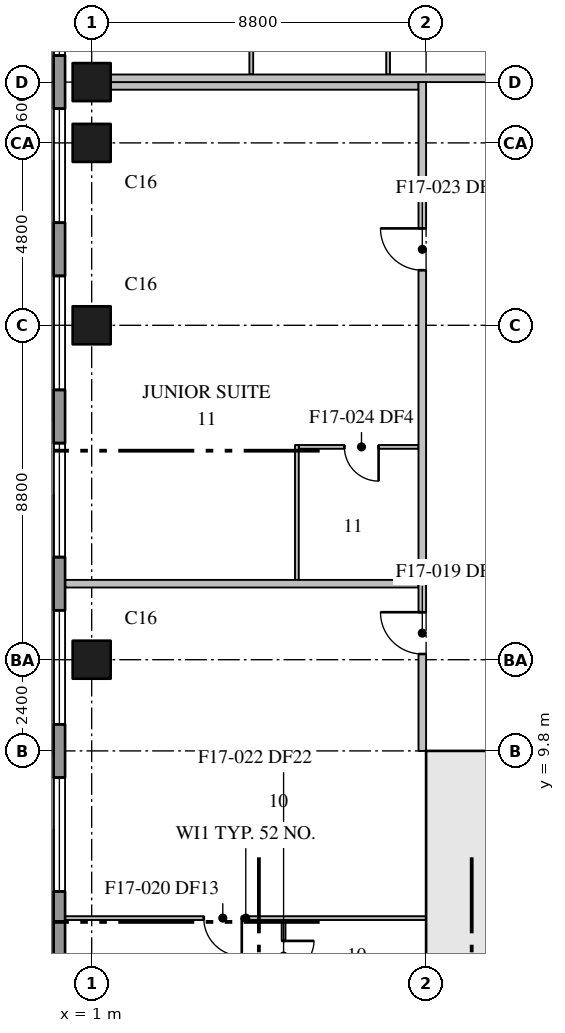
"""IFC4 building model, lengths in metres.
Left out: names, types, materials, properties, quantities, classifications, styles, units other than length and angle.
Written with IfcOpenShell. Run it as: python <this file> out.ifc"""

import sys

from ifc_helpers import new_model, si_unit, direction, frame, frame_2d, origin, origin_2d, place, context, subcontext, project, spatial, rectangle, extrude, element, fill, save


model = new_model("IFC4")
c1 = context("Model", 3, precision=1e-05, world=origin(), true_north=direction((0.0, 1.0)))
c2 = subcontext(c1, "Body", "Model", "MODEL_VIEW")
j1 = project(units=[si_unit("LENGTHUNIT", "METRE"), si_unit("PLANEANGLEUNIT", "RADIAN")], contexts=[c1])
p1 = place(None, origin())
s1 = spatial("IfcSite", under=j1, at=p1, CompositionType="ELEMENT")
p2 = place(p1, origin())
s2 = spatial("IfcBuilding", under=s1, at=p2, CompositionType="ELEMENT")
p3 = place(p2, frame((0.0, 0.0, 153.1)))
s3 = spatial("IfcBuildingStorey", under=s2, at=p3, CompositionType="ELEMENT", Elevation=153.1)
for number, where, z_axis, x_axis in (
    (1, (1.0, 12.2, 0.0), (0.0, 0.0, 1.0), (1.0, 0.0, 0.0)),
    (2, (1.0, 21.0, 0.0), (0.0, 0.0, 1.0), (1.0, 0.0, 0.0)),
    (3, (1.0, 25.8, 0.0), (0.0, 0.0, 1.0), (1.0, 0.0, 0.0)),
    (4, (1.0, 27.4, 0.0), (0.0, 0.0, 1.0), (1.0, 0.0, 0.0)),
):
    element("IfcColumn", number, at=place(p3, frame(where, z_axis=z_axis, x_axis=x_axis)), inside=s3, PredefinedType="COLUMN", context=c2, shape_type="SweptSolid", body=[
        extrude(rectangle(XDim=1.0, YDim=1.0, at=origin_2d()), origin(), (0.0, 0.0, 1.0), 3.7),
    ])
p4 = place(p3, frame((10.675, 1.2, 0.0), z_axis=(0.0, 0.0, 1.0), x_axis=(0.0, 1.0, 0.0)))
e5 = element("IfcWall", 5, at=p4, inside=s3, PredefinedType="SHEAR", context=c2, shape_type="SweptSolid", body=[
    extrude(rectangle(XDim=8.6, YDim=0.65, at=frame_2d((4.3, 0.0))), origin(), (0.0, 0.0, 1.0), 3.7),
])
p5 = place(p3, frame((9.8, 9.6, 0.0), z_axis=(0.0, 0.0, 1.0), x_axis=(1.0, 0.0, 0.0)))
e6 = element("IfcWall", 6, at=p5, inside=s3, PredefinedType="SHEAR", context=c2, shape_type="SweptSolid", body=[
    extrude(rectangle(XDim=4.3, YDim=0.4, at=frame_2d((2.15, 0.0))), origin(), (0.0, 0.0, 1.0), 3.7),
])
p6 = place(p5, frame((2.05, 0.0, 0.0)))
e7 = element("IfcOpeningElement", 7, at=p6, cuts=e6, PredefinedType="OPENING", context=c2, shape_type="SweptSolid", body=[
    extrude(rectangle(XDim=1.2, YDim=2.1, at=frame_2d((0.6, 1.05))), frame((0.0, 0.21, 0.0), z_axis=(0.0, -1.0, 0.0), x_axis=(1.0, 0.0, 0.0)), (0.0, 0.0, 1.0), 0.42),
])
p7 = place(p3, frame((0.15, 61.1, 0.0), z_axis=(0.0, 0.0, 1.0), x_axis=(0.0, -1.0, 0.0)))
e8 = element("IfcWall", 8, at=p7, inside=s3, PredefinedType="STANDARD", context=c2, shape_type="SweptSolid", body=[
    extrude(rectangle(XDim=58.9, YDim=0.3, at=frame_2d((29.45, 0.0))), origin(), (0.0, 0.0, 1.0), 3.4),
])
p8 = place(p7, frame((3.6, 0.0, 0.75)))
e9 = element("IfcOpeningElement", 9, at=p8, cuts=e8, PredefinedType="OPENING", context=c2, shape_type="SweptSolid", body=[
    extrude(rectangle(XDim=3.0, YDim=2.3, at=frame_2d((1.5, 1.15))), frame((0.0, 0.16, 0.0), z_axis=(0.0, -1.0, 0.0), x_axis=(1.0, 0.0, 0.0)), (0.0, 0.0, 1.0), 0.32),
])
p9 = place(p7, frame((8.0, 0.0, 0.75)))
e10 = element("IfcOpeningElement", 10, at=p9, cuts=e8, PredefinedType="OPENING", context=c2, shape_type="SweptSolid", body=[
    extrude(rectangle(XDim=3.0, YDim=2.3, at=frame_2d((1.5, 1.15))), frame((0.0, 0.16, 0.0), z_axis=(0.0, -1.0, 0.0), x_axis=(1.0, 0.0, 0.0)), (0.0, 0.0, 1.0), 0.32),
])
p10 = place(p7, frame((12.4, 0.0, 0.75)))
e11 = element("IfcOpeningElement", 11, at=p10, cuts=e8, PredefinedType="OPENING", context=c2, shape_type="SweptSolid", body=[
    extrude(rectangle(XDim=3.0, YDim=2.3, at=frame_2d((1.5, 1.15))), frame((0.0, 0.16, 0.0), z_axis=(0.0, -1.0, 0.0), x_axis=(1.0, 0.0, 0.0)), (0.0, 0.0, 1.0), 0.32),
])
p11 = place(p7, frame((16.8, 0.0, 0.75)))
e12 = element("IfcOpeningElement", 12, at=p11, cuts=e8, PredefinedType="OPENING", context=c2, shape_type="SweptSolid", body=[
    extrude(rectangle(XDim=3.0, YDim=2.3, at=frame_2d((1.5, 1.15))), frame((0.0, 0.16, 0.0), z_axis=(0.0, -1.0, 0.0), x_axis=(1.0, 0.0, 0.0)), (0.0, 0.0, 1.0), 0.32),
])
p12 = place(p7, frame((21.2, 0.0, 0.75)))
e13 = element("IfcOpeningElement", 13, at=p12, cuts=e8, PredefinedType="OPENING", context=c2, shape_type="SweptSolid", body=[
    extrude(rectangle(XDim=3.0, YDim=2.3, at=frame_2d((1.5, 1.15))), frame((0.0, 0.16, 0.0), z_axis=(0.0, -1.0, 0.0), x_axis=(1.0, 0.0, 0.0)), (0.0, 0.0, 1.0), 0.32),
])
p13 = place(p7, frame((25.6, 0.0, 0.75)))
e14 = element("IfcOpeningElement", 14, at=p13, cuts=e8, PredefinedType="OPENING", context=c2, shape_type="SweptSolid", body=[
    extrude(rectangle(XDim=3.0, YDim=2.3, at=frame_2d((1.5, 1.15))), frame((0.0, 0.16, 0.0), z_axis=(0.0, -1.0, 0.0), x_axis=(1.0, 0.0, 0.0)), (0.0, 0.0, 1.0), 0.32),
])
p14 = place(p7, frame((30.0, 0.0, 0.75)))
e15 = element("IfcOpeningElement", 15, at=p14, cuts=e8, PredefinedType="OPENING", context=c2, shape_type="SweptSolid", body=[
    extrude(rectangle(XDim=3.0, YDim=2.3, at=frame_2d((1.5, 1.15))), frame((0.0, 0.16, 0.0), z_axis=(0.0, -1.0, 0.0), x_axis=(1.0, 0.0, 0.0)), (0.0, 0.0, 1.0), 0.32),
])
p15 = place(p7, frame((34.4, 0.0, 0.75)))
e16 = element("IfcOpeningElement", 16, at=p15, cuts=e8, PredefinedType="OPENING", context=c2, shape_type="SweptSolid", body=[
    extrude(rectangle(XDim=3.0, YDim=2.3, at=frame_2d((1.5, 1.15))), frame((0.0, 0.16, 0.0), z_axis=(0.0, -1.0, 0.0), x_axis=(1.0, 0.0, 0.0)), (0.0, 0.0, 1.0), 0.32),
])
p16 = place(p7, frame((38.8, 0.0, 0.75)))
e17 = element("IfcOpeningElement", 17, at=p16, cuts=e8, PredefinedType="OPENING", context=c2, shape_type="SweptSolid", body=[
    extrude(rectangle(XDim=3.0, YDim=2.3, at=frame_2d((1.5, 1.15))), frame((0.0, 0.16, 0.0), z_axis=(0.0, -1.0, 0.0), x_axis=(1.0, 0.0, 0.0)), (0.0, 0.0, 1.0), 0.32),
])
p17 = place(p7, frame((43.2, 0.0, 0.75)))
e18 = element("IfcOpeningElement", 18, at=p17, cuts=e8, PredefinedType="OPENING", context=c2, shape_type="SweptSolid", body=[
    extrude(rectangle(XDim=3.0, YDim=2.3, at=frame_2d((1.5, 1.15))), frame((0.0, 0.16, 0.0), z_axis=(0.0, -1.0, 0.0), x_axis=(1.0, 0.0, 0.0)), (0.0, 0.0, 1.0), 0.32),
])
p18 = place(p7, frame((47.6, 0.0, 0.75)))
e19 = element("IfcOpeningElement", 19, at=p18, cuts=e8, PredefinedType="OPENING", context=c2, shape_type="SweptSolid", body=[
    extrude(rectangle(XDim=3.0, YDim=2.3, at=frame_2d((1.5, 1.15))), frame((0.0, 0.16, 0.0), z_axis=(0.0, -1.0, 0.0), x_axis=(1.0, 0.0, 0.0)), (0.0, 0.0, 1.0), 0.32),
])
p19 = place(p7, frame((52.0, 0.0, 0.75)))
e20 = element("IfcOpeningElement", 20, at=p19, cuts=e8, PredefinedType="OPENING", context=c2, shape_type="SweptSolid", body=[
    extrude(rectangle(XDim=3.0, YDim=2.3, at=frame_2d((1.5, 1.15))), frame((0.0, 0.16, 0.0), z_axis=(0.0, -1.0, 0.0), x_axis=(1.0, 0.0, 0.0)), (0.0, 0.0, 1.0), 0.32),
])
p20 = place(p3, frame((9.7, 9.8, 0.0), z_axis=(0.0, 0.0, 1.0), x_axis=(0.0, 1.0, 0.0)))
e21 = element("IfcWall", 21, at=p20, inside=s3, PredefinedType="PARTITIONING", context=c2, shape_type="SweptSolid", body=[
    extrude(rectangle(XDim=17.6, YDim=0.2, at=frame_2d((8.8, 0.0))), origin(), (0.0, 0.0, 1.0), 3.4),
])
p21 = place(p20, frame((2.55, 0.0, 0.0)))
e22 = element("IfcOpeningElement", 22, at=p21, cuts=e21, PredefinedType="OPENING", context=c2, shape_type="SweptSolid", body=[
    extrude(rectangle(XDim=1.1, YDim=2.1, at=frame_2d((0.55, 1.05))), frame((0.0, 0.11, 0.0), z_axis=(0.0, -1.0, 0.0), x_axis=(1.0, 0.0, 0.0)), (0.0, 0.0, 1.0), 0.22),
])
p22 = place(p20, frame((12.65, 0.0, 0.0)))
e23 = element("IfcOpeningElement", 23, at=p22, cuts=e21, PredefinedType="OPENING", context=c2, shape_type="SweptSolid", body=[
    extrude(rectangle(XDim=1.1, YDim=2.1, at=frame_2d((0.55, 1.05))), frame((0.0, 0.11, 0.0), z_axis=(0.0, -1.0, 0.0), x_axis=(1.0, 0.0, 0.0)), (0.0, 0.0, 1.0), 0.22),
])
p23 = place(p3, frame((0.31, 14.2, 0.0), z_axis=(0.0, 0.0, 1.0), x_axis=(1.0, 0.0, 0.0)))
e24 = element("IfcWall", 24, at=p23, inside=s3, PredefinedType="PARTITIONING", context=c2, shape_type="SweptSolid", body=[
    extrude(rectangle(XDim=9.29, YDim=0.2, at=frame_2d((4.645, 0.0))), origin(), (0.0, 0.0, 1.0), 3.4),
])
p24 = place(p3, frame((1.5, 27.3, 0.0), z_axis=(0.0, 0.0, 1.0), x_axis=(1.0, 0.0, 0.0)))
e25 = element("IfcWall", 25, at=p24, inside=s3, PredefinedType="PARTITIONING", context=c2, shape_type="SweptSolid", body=[
    extrude(rectangle(XDim=8.1, YDim=0.2, at=frame_2d((4.05, 0.0))), origin(), (0.0, 0.0, 1.0), 3.4),
])
p25 = place(p3, frame((1.5, 27.5, 0.0), z_axis=(0.0, 0.0, 1.0), x_axis=(1.0, 0.0, 0.0)))
e26 = element("IfcWall", 26, at=p25, inside=s3, PredefinedType="PARTITIONING", context=c2, shape_type="SweptSolid", body=[
    extrude(rectangle(XDim=10.3, YDim=0.2, at=frame_2d((5.15, 0.0))), origin(), (0.0, 0.0, 1.0), 3.4),
])
p26 = place(p3, frame((9.6, 17.8, 0.0), z_axis=(0.0, 0.0, 1.0), x_axis=(-1.0, 0.0, 0.0)))
e27 = element("IfcWall", 27, at=p26, inside=s3, PredefinedType="PARTITIONING", context=c2, shape_type="SweptSolid", body=[
    extrude(rectangle(XDim=3.15, YDim=0.1, at=frame_2d((1.575, 0.0))), origin(), (0.0, 0.0, 1.0), 3.4),
])
p27 = place(p26, frame((1.05, 0.0, 0.0)))
e28 = element("IfcOpeningElement", 28, at=p27, cuts=e27, PredefinedType="OPENING", context=c2, shape_type="SweptSolid", body=[
    extrude(rectangle(XDim=0.9, YDim=2.1, at=frame_2d((0.45, 1.05))), frame((0.0, 0.06, 0.0), z_axis=(0.0, -1.0, 0.0), x_axis=(1.0, 0.0, 0.0)), (0.0, 0.0, 1.0), 0.12),
])
p28 = place(p3, frame((6.05, 5.35, 0.0), z_axis=(0.0, 0.0, 1.0), x_axis=(0.0, -1.0, 0.0)))
e29 = element("IfcWall", 29, at=p28, inside=s3, PredefinedType="PARTITIONING", context=c2, shape_type="SweptSolid", body=[
    extrude(rectangle(XDim=4.4, YDim=0.1, at=frame_2d((2.2, 0.0))), origin(), (0.0, 0.0, 1.0), 3.4),
])
p29 = place(p28, frame((2.7, 0.0, 0.0)))
e30 = element("IfcOpeningElement", 30, at=p29, cuts=e29, PredefinedType="OPENING", context=c2, shape_type="SweptSolid", body=[
    extrude(rectangle(XDim=0.9, YDim=2.1, at=frame_2d((0.45, 1.05))), frame((0.0, 0.06, 0.0), z_axis=(0.0, -1.0, 0.0), x_axis=(1.0, 0.0, 0.0)), (0.0, 0.0, 1.0), 0.12),
])
p30 = place(p28, frame((0.55, 0.0, 0.0)))
e31 = element("IfcOpeningElement", 31, at=p30, cuts=e29, PredefinedType="OPENING", context=c2, shape_type="SweptSolid", body=[
    extrude(rectangle(XDim=0.8, YDim=2.1, at=frame_2d((0.4, 1.05))), frame((0.0, 0.06, 0.0), z_axis=(0.0, -1.0, 0.0), x_axis=(1.0, 0.0, 0.0)), (0.0, 0.0, 1.0), 0.12),
])
p31 = place(p3, frame((9.8, 5.4, 0.0), z_axis=(0.0, 0.0, 1.0), x_axis=(-1.0, 0.0, 0.0)))
e32 = element("IfcWall", 32, at=p31, inside=s3, PredefinedType="PARTITIONING", context=c2, shape_type="SweptSolid", body=[
    extrude(rectangle(XDim=9.49, YDim=0.1, at=frame_2d((4.745, 0.0))), origin(), (0.0, 0.0, 1.0), 3.4),
])
p32 = place(p31, frame((4.85, 0.0, 0.0)))
e33 = element("IfcOpeningElement", 33, at=p32, cuts=e32, PredefinedType="OPENING", context=c2, shape_type="SweptSolid", body=[
    extrude(rectangle(XDim=1.0, YDim=2.1, at=frame_2d((0.5, 1.05))), frame((0.0, 0.06, 0.0), z_axis=(0.0, -1.0, 0.0), x_axis=(1.0, 0.0, 0.0)), (0.0, 0.0, 1.0), 0.12),
])
p33 = place(p3, frame((6.4, 14.3, 0.0), z_axis=(0.0, 0.0, 1.0), x_axis=(0.0, 1.0, 0.0)))
e34 = element("IfcWall", 34, at=p33, inside=s3, PredefinedType="PARTITIONING", context=c2, shape_type="SweptSolid", body=[
    extrude(rectangle(XDim=3.55, YDim=0.1, at=frame_2d((1.775, 0.0))), origin(), (0.0, 0.0, 1.0), 3.4),
])
p34 = place(p3, frame((5.2, 27.6, 0.0), z_axis=(0.0, 0.0, 1.0), x_axis=(0.0, 1.0, 0.0)))
e35 = element("IfcWall", 35, at=p34, inside=s3, PredefinedType="PARTITIONING", context=c2, shape_type="SweptSolid", body=[
    extrude(rectangle(XDim=2.55, YDim=0.1, at=frame_2d((1.275, 0.0))), origin(), (0.0, 0.0, 1.0), 3.4),
])
p35 = place(p3, frame((8.8, 27.6, 0.0), z_axis=(0.0, 0.0, 1.0), x_axis=(0.0, 1.0, 0.0)))
e36 = element("IfcWall", 36, at=p35, inside=s3, PredefinedType="PARTITIONING", context=c2, shape_type="SweptSolid", body=[
    extrude(rectangle(XDim=2.45, YDim=0.1, at=frame_2d((1.225, 0.0))), origin(), (0.0, 0.0, 1.0), 3.4),
])
p36 = place(p14, origin())
e37 = element("IfcWindow", 37, at=p36, inside=s3, PartitioningType="SINGLE_PANEL", PredefinedType="WINDOW", context=c2, shape_type="SweptSolid", body=[
    extrude(rectangle(XDim=3.0, YDim=2.3, at=frame_2d((1.5, 1.15))), frame((0.0, 0.03, 0.0), z_axis=(0.0, -1.0, 0.0), x_axis=(1.0, 0.0, 0.0)), (0.0, 0.0, 1.0), 0.06),
])
fill(e15, e37)
p37 = place(p15, origin())
e38 = element("IfcWindow", 38, at=p37, inside=s3, PartitioningType="SINGLE_PANEL", PredefinedType="WINDOW", context=c2, shape_type="SweptSolid", body=[
    extrude(rectangle(XDim=3.0, YDim=2.3, at=frame_2d((1.5, 1.15))), frame((0.0, 0.03, 0.0), z_axis=(0.0, -1.0, 0.0), x_axis=(1.0, 0.0, 0.0)), (0.0, 0.0, 1.0), 0.06),
])
fill(e16, e38)
p38 = place(p16, origin())
e39 = element("IfcWindow", 39, at=p38, inside=s3, PartitioningType="SINGLE_PANEL", PredefinedType="WINDOW", context=c2, shape_type="SweptSolid", body=[
    extrude(rectangle(XDim=3.0, YDim=2.3, at=frame_2d((1.5, 1.15))), frame((0.0, 0.03, 0.0), z_axis=(0.0, -1.0, 0.0), x_axis=(1.0, 0.0, 0.0)), (0.0, 0.0, 1.0), 0.06),
])
fill(e17, e39)
p39 = place(p17, origin())
e40 = element("IfcWindow", 40, at=p39, inside=s3, PartitioningType="SINGLE_PANEL", PredefinedType="WINDOW", context=c2, shape_type="SweptSolid", body=[
    extrude(rectangle(XDim=3.0, YDim=2.3, at=frame_2d((1.5, 1.15))), frame((0.0, 0.03, 0.0), z_axis=(0.0, -1.0, 0.0), x_axis=(1.0, 0.0, 0.0)), (0.0, 0.0, 1.0), 0.06),
])
fill(e18, e40)
p40 = place(p18, origin())
e41 = element("IfcWindow", 41, at=p40, inside=s3, PartitioningType="SINGLE_PANEL", PredefinedType="WINDOW", context=c2, shape_type="SweptSolid", body=[
    extrude(rectangle(XDim=3.0, YDim=2.3, at=frame_2d((1.5, 1.15))), frame((0.0, 0.03, 0.0), z_axis=(0.0, -1.0, 0.0), x_axis=(1.0, 0.0, 0.0)), (0.0, 0.0, 1.0), 0.06),
])
fill(e19, e41)
p41 = place(p19, origin())
e42 = element("IfcWindow", 42, at=p41, inside=s3, PartitioningType="SINGLE_PANEL", PredefinedType="WINDOW", context=c2, shape_type="SweptSolid", body=[
    extrude(rectangle(XDim=3.0, YDim=2.3, at=frame_2d((1.5, 1.15))), frame((0.0, 0.03, 0.0), z_axis=(0.0, -1.0, 0.0), x_axis=(1.0, 0.0, 0.0)), (0.0, 0.0, 1.0), 0.06),
])
fill(e20, e42)
p42 = place(p21, origin())
e43 = element("IfcDoor", 43, at=p42, inside=s3, OperationType="SINGLE_SWING_RIGHT", PredefinedType="DOOR", context=c2, shape_type="SweptSolid", body=[
    extrude(rectangle(XDim=1.1, YDim=2.1, at=frame_2d((0.55, 1.05))), frame((0.0, 0.025, 0.0), z_axis=(0.0, -1.0, 0.0), x_axis=(1.0, 0.0, 0.0)), (0.0, 0.0, 1.0), 0.05),
])
fill(e22, e43)
p43 = place(p32, origin())
e44 = element("IfcDoor", 44, at=p43, inside=s3, OperationType="SINGLE_SWING_LEFT", PredefinedType="DOOR", context=c2, shape_type="SweptSolid", body=[
    extrude(rectangle(XDim=1.0, YDim=2.1, at=frame_2d((0.5, 1.05))), frame((0.0, 0.025, 0.0), z_axis=(0.0, -1.0, 0.0), x_axis=(1.0, 0.0, 0.0)), (0.0, 0.0, 1.0), 0.05),
])
fill(e33, e44)
p44 = place(p30, origin())
e45 = element("IfcDoor", 45, at=p44, inside=s3, OperationType="SINGLE_SWING_LEFT", PredefinedType="DOOR", context=c2, shape_type="SweptSolid", body=[
    extrude(rectangle(XDim=0.8, YDim=2.1, at=frame_2d((0.4, 1.05))), frame((0.0, 0.025, 0.0), z_axis=(0.0, -1.0, 0.0), x_axis=(1.0, 0.0, 0.0)), (0.0, 0.0, 1.0), 0.05),
])
fill(e31, e45)
p45 = place(p22, origin())
e46 = element("IfcDoor", 46, at=p45, inside=s3, OperationType="SINGLE_SWING_RIGHT", PredefinedType="DOOR", context=c2, shape_type="SweptSolid", body=[
    extrude(rectangle(XDim=1.1, YDim=2.1, at=frame_2d((0.55, 1.05))), frame((0.0, 0.025, 0.0), z_axis=(0.0, -1.0, 0.0), x_axis=(1.0, 0.0, 0.0)), (0.0, 0.0, 1.0), 0.05),
])
fill(e23, e46)
p46 = place(p27, origin())
e47 = element("IfcDoor", 47, at=p46, inside=s3, OperationType="SINGLE_SWING_LEFT", PredefinedType="DOOR", context=c2, shape_type="SweptSolid", body=[
    extrude(rectangle(XDim=0.9, YDim=2.1, at=frame_2d((0.45, 1.05))), frame((0.0, 0.025, 0.0), z_axis=(0.0, -1.0, 0.0), x_axis=(1.0, 0.0, 0.0)), (0.0, 0.0, 1.0), 0.05),
])
fill(e28, e47)
save(model, sys.argv[1])
